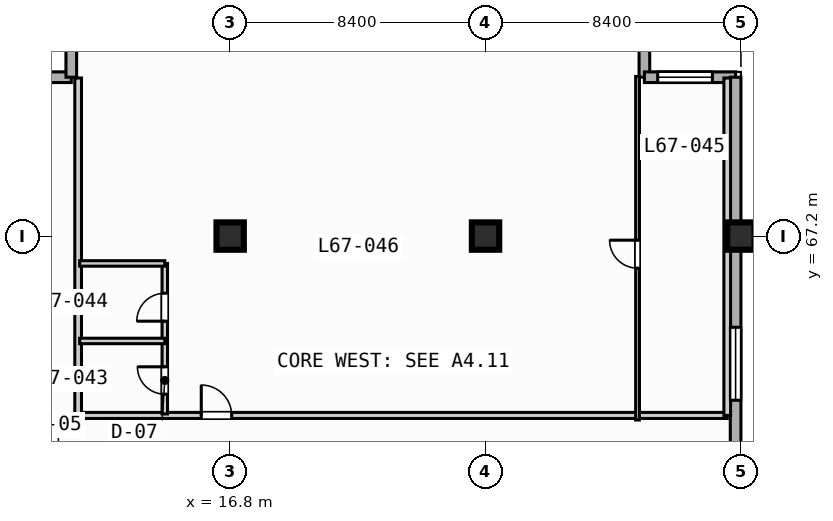
"""IFC4 building model, lengths in metres.
Left out: names, types, materials, properties, quantities, classifications, styles, units other than length and angle.
Written with IfcOpenShell. Run it as: python <this file> out.ifc"""

import sys

from ifc_helpers import new_model, si_unit, direction, frame, frame_2d, origin, origin_2d, place, context, subcontext, project, spatial, rectangle, extrude, element, fill, save


model = new_model("IFC4")
c1 = context("Model", 3, precision=1e-05, world=origin(), true_north=direction((0.0, 1.0)))
c2 = subcontext(c1, "Body", "Model", "MODEL_VIEW")
j1 = project(units=[si_unit("LENGTHUNIT", "METRE"), si_unit("PLANEANGLEUNIT", "RADIAN")], contexts=[c1])
p1 = place(None, origin())
s1 = spatial("IfcSite", under=j1, at=p1, CompositionType="ELEMENT")
p2 = place(p1, origin())
s2 = spatial("IfcBuilding", under=s1, at=p2, CompositionType="ELEMENT")
p3 = place(p2, frame((0.0, 0.0, 271.2)))
s3 = spatial("IfcBuildingStorey", under=s2, at=p3, CompositionType="ELEMENT", Elevation=271.2)
for number, where, z_axis, x_axis in (
    (1, (16.8, 67.2, 0.0), (0.0, 0.0, 1.0), (1.0, 0.0, 0.0)),
    (2, (25.2, 67.2, 0.0), (0.0, 0.0, 1.0), (1.0, 0.0, 0.0)),
    (3, (33.6, 67.2, 0.0), (0.0, 0.0, 1.0), (1.0, 0.0, 0.0)),
):
    element("IfcColumn", number, at=place(p3, frame(where, z_axis=z_axis, x_axis=x_axis)), inside=s3, PredefinedType="COLUMN", context=c2, shape_type="SweptSolid", body=[
        extrude(rectangle(XDim=0.9, YDim=0.9, at=origin_2d()), origin(), (0.0, 0.0, 1.0), 3.7),
    ])
for number, where, z_axis, x_axis in (
    (4, (8.575, 72.425, 0.0), (0.0, 0.0, 1.0), (1.0, 0.0, 0.0)),
    (5, (11.575, 72.425, 0.0), (0.0, 0.0, 1.0), (0.0, 1.0, 0.0)),
    (6, (30.425, 75.425, 0.0), (0.0, 0.0, 1.0), (0.0, -1.0, 0.0)),
):
    element("IfcWall", number, at=place(p3, frame(where, z_axis=z_axis, x_axis=x_axis)), inside=s3, PredefinedType="STANDARD", context=c2, shape_type="SweptSolid", body=[
        extrude(rectangle(XDim=3.0, YDim=0.35, at=frame_2d((1.5, 0.0))), origin(), (0.0, 0.0, 1.0), 3.47),
    ])
p4 = place(p3, frame((30.425, 72.425, 0.0), z_axis=(0.0, 0.0, 1.0), x_axis=(1.0, 0.0, 0.0)))
e7 = element("IfcWall", 7, at=p4, inside=s3, PredefinedType="STANDARD", context=c2, shape_type="SweptSolid", body=[
    extrude(rectangle(XDim=3.0, YDim=0.35, at=frame_2d((1.5, 0.0))), origin(), (0.0, 0.0, 1.0), 3.47),
])
p5 = place(p4, frame((0.438, 0.0, 0.85)))
e8 = element("IfcOpeningElement", 8, at=p5, cuts=e7, PredefinedType="OPENING", context=c2, shape_type="SweptSolid", body=[
    extrude(rectangle(XDim=1.8, YDim=1.8, at=frame_2d((0.9, 0.9))), frame((0.0, 0.185, 0.0), z_axis=(0.0, -1.0, 0.0), x_axis=(1.0, 0.0, 0.0)), (0.0, 0.0, 1.0), 0.37),
])
p6 = place(p3, frame((33.425, 72.425, 0.0), z_axis=(0.0, 0.0, 1.0), x_axis=(0.0, -1.0, 0.0)))
e9 = element("IfcWall", 9, at=p6, inside=s3, PredefinedType="STANDARD", context=c2, shape_type="SweptSolid", body=[
    extrude(rectangle(XDim=39.0, YDim=0.35, at=frame_2d((19.5, 0.0))), origin(), (0.0, 0.0, 1.0), 3.47),
])
p7 = place(p6, frame((33.725, 0.0, 0.85)))
e10 = element("IfcOpeningElement", 10, at=p7, cuts=e9, PredefinedType="OPENING", context=c2, shape_type="SweptSolid", body=[
    extrude(rectangle(XDim=1.8, YDim=1.8, at=frame_2d((0.9, 0.9))), frame((0.0, 0.185, 0.0), z_axis=(0.0, -1.0, 0.0), x_axis=(1.0, 0.0, 0.0)), (0.0, 0.0, 1.0), 0.37),
])
p8 = place(p6, frame((8.225, 0.0, 0.85)))
e11 = element("IfcOpeningElement", 11, at=p8, cuts=e9, PredefinedType="OPENING", context=c2, shape_type="SweptSolid", body=[
    extrude(rectangle(XDim=2.4, YDim=1.95, at=frame_2d((1.2, 0.975))), frame((0.0, 0.185, 0.0), z_axis=(0.0, -1.0, 0.0), x_axis=(1.0, 0.0, 0.0)), (0.0, 0.0, 1.0), 0.37),
])
p9 = place(p3, frame((11.8, 61.3, 0.0), z_axis=(0.0, 0.0, 1.0), x_axis=(1.0, 0.0, 0.0)))
e12 = element("IfcWall", 12, at=p9, inside=s3, PredefinedType="PARTITIONING", context=c2, shape_type="SweptSolid", body=[
    extrude(rectangle(XDim=21.35, YDim=0.2, at=frame_2d((10.675, 0.0))), origin(), (0.0, 0.0, 1.0), 3.47),
])
p10 = place(p9, frame((4.05, 0.0, 0.0)))
e13 = element("IfcOpeningElement", 13, at=p10, cuts=e12, PredefinedType="OPENING", context=c2, shape_type="SweptSolid", body=[
    extrude(rectangle(XDim=1.0, YDim=2.15, at=frame_2d((0.5, 1.075))), frame((0.0, 0.11, 0.0), z_axis=(0.0, -1.0, 0.0), x_axis=(1.0, 0.0, 0.0)), (0.0, 0.0, 1.0), 0.22),
])
for number, where, z_axis, x_axis in (
    (14, (33.15, 61.3, 0.0), (0.0, 0.0, 1.0), (0.0, 1.0, 0.0)),
    (15, (11.8, 61.3, 0.0), (0.0, 0.0, 1.0), (0.0, 1.0, 0.0)),
):
    element("IfcWall", number, at=place(p3, frame(where, z_axis=z_axis, x_axis=x_axis)), inside=s3, PredefinedType="PARTITIONING", context=c2, shape_type="SweptSolid", body=[
        extrude(rectangle(XDim=11.1, YDim=0.22, at=frame_2d((5.55, 0.0))), origin(), (0.0, 0.0, 1.0), 3.47),
    ])
p11 = place(p3, frame((14.65, 61.35, 0.0), z_axis=(0.0, 0.0, 1.0), x_axis=(0.0, 1.0, 0.0)))
e16 = element("IfcWall", 16, at=p11, inside=s3, PredefinedType="PLUMBINGWALL", context=c2, shape_type="SweptSolid", body=[
    extrude(rectangle(XDim=4.95, YDim=0.18, at=frame_2d((2.475, 0.0))), origin(), (0.0, 0.0, 1.0), 3.47),
])
p12 = place(p11, frame((0.65, 0.0, 0.0)))
e17 = element("IfcOpeningElement", 17, at=p12, cuts=e16, PredefinedType="OPENING", context=c2, shape_type="SweptSolid", body=[
    extrude(rectangle(XDim=0.9, YDim=2.1, at=frame_2d((0.45, 1.05))), frame((0.0, 0.1, 0.0), z_axis=(0.0, -1.0, 0.0), x_axis=(1.0, 0.0, 0.0)), (0.0, 0.0, 1.0), 0.2),
])
p13 = place(p11, frame((3.05, 0.0, 0.0)))
e18 = element("IfcOpeningElement", 18, at=p13, cuts=e16, PredefinedType="OPENING", context=c2, shape_type="SweptSolid", body=[
    extrude(rectangle(XDim=0.92, YDim=2.1, at=frame_2d((0.46, 1.05))), frame((0.0, 0.1, 0.0), z_axis=(0.0, -1.0, 0.0), x_axis=(1.0, 0.0, 0.0)), (0.0, 0.0, 1.0), 0.2),
])
for number, where, z_axis, x_axis in (
    (19, (11.85, 63.75, 0.0), (0.0, 0.0, 1.0), (1.0, 0.0, 0.0)),
    (20, (11.85, 66.3, 0.0), (0.0, 0.0, 1.0), (1.0, 0.0, 0.0)),
):
    element("IfcWall", number, at=place(p3, frame(where, z_axis=z_axis, x_axis=x_axis)), inside=s3, PredefinedType="PLUMBINGWALL", context=c2, shape_type="SweptSolid", body=[
        extrude(rectangle(XDim=2.8, YDim=0.18, at=frame_2d((1.4, 0.0))), origin(), (0.0, 0.0, 1.0), 3.47),
    ])
p14 = place(p3, frame((30.2, 61.15, 0.0), z_axis=(0.0, 0.0, 1.0), x_axis=(0.0, 1.0, 0.0)))
e21 = element("IfcWall", 21, at=p14, inside=s3, PredefinedType="PARTITIONING", context=c2, shape_type="SweptSolid", body=[
    extrude(rectangle(XDim=11.3, YDim=0.125, at=frame_2d((5.65, 0.0))), origin(), (0.0, 0.0, 1.0), 3.47),
])
p15 = place(p14, frame((4.995, 0.0, 0.0)))
e22 = element("IfcOpeningElement", 22, at=p15, cuts=e21, PredefinedType="OPENING", context=c2, shape_type="SweptSolid", body=[
    extrude(rectangle(XDim=0.92, YDim=2.1, at=frame_2d((0.46, 1.05))), frame((0.0, 0.073, 0.0), z_axis=(0.0, -1.0, 0.0), x_axis=(1.0, 0.0, 0.0)), (0.0, 0.0, 1.0), 0.145),
])
p16 = place(p5, origin())
e23 = element("IfcWindow", 23, at=p16, inside=s3, PartitioningType="SINGLE_PANEL", PredefinedType="WINDOW", context=c2, shape_type="SweptSolid", body=[
    extrude(rectangle(XDim=1.8, YDim=1.8, at=frame_2d((0.9, 0.9))), frame((0.0, 0.03, 0.0), z_axis=(0.0, -1.0, 0.0), x_axis=(1.0, 0.0, 0.0)), (0.0, 0.0, 1.0), 0.06),
])
fill(e8, e23)
p17 = place(p8, origin())
e24 = element("IfcWindow", 24, at=p17, inside=s3, PartitioningType="SINGLE_PANEL", PredefinedType="WINDOW", context=c2, shape_type="SweptSolid", body=[
    extrude(rectangle(XDim=2.4, YDim=1.95, at=frame_2d((1.2, 0.975))), frame((0.0, 0.03, 0.0), z_axis=(0.0, -1.0, 0.0), x_axis=(1.0, 0.0, 0.0)), (0.0, 0.0, 1.0), 0.06),
])
fill(e11, e24)
p18 = place(p10, origin())
e25 = element("IfcDoor", 25, at=p18, inside=s3, OperationType="SINGLE_SWING_LEFT", PredefinedType="DOOR", context=c2, shape_type="SweptSolid", body=[
    extrude(rectangle(XDim=1.0, YDim=2.15, at=frame_2d((0.5, 1.075))), frame((0.0, 0.025, 0.0), z_axis=(0.0, -1.0, 0.0), x_axis=(1.0, 0.0, 0.0)), (0.0, 0.0, 1.0), 0.05),
])
fill(e13, e25)
p19 = place(p12, origin())
e26 = element("IfcDoor", 26, at=p19, inside=s3, OperationType="SINGLE_SWING_RIGHT", PredefinedType="DOOR", context=c2, shape_type="SweptSolid", body=[
    extrude(rectangle(XDim=0.9, YDim=2.1, at=frame_2d((0.45, 1.05))), frame((0.0, 0.025, 0.0), z_axis=(0.0, -1.0, 0.0), x_axis=(1.0, 0.0, 0.0)), (0.0, 0.0, 1.0), 0.05),
])
fill(e17, e26)
p20 = place(p13, origin())
e27 = element("IfcDoor", 27, at=p20, inside=s3, OperationType="SINGLE_SWING_LEFT", PredefinedType="DOOR", context=c2, shape_type="SweptSolid", body=[
    extrude(rectangle(XDim=0.92, YDim=2.1, at=frame_2d((0.46, 1.05))), frame((0.0, 0.025, 0.0), z_axis=(0.0, -1.0, 0.0), x_axis=(1.0, 0.0, 0.0)), (0.0, 0.0, 1.0), 0.05),
])
fill(e18, e27)
p21 = place(p15, origin())
e28 = element("IfcDoor", 28, at=p21, inside=s3, OperationType="SINGLE_SWING_RIGHT", PredefinedType="DOOR", context=c2, shape_type="SweptSolid", body=[
    extrude(rectangle(XDim=0.92, YDim=2.1, at=frame_2d((0.46, 1.05))), frame((0.0, 0.025, 0.0), z_axis=(0.0, -1.0, 0.0), x_axis=(1.0, 0.0, 0.0)), (0.0, 0.0, 1.0), 0.05),
])
fill(e22, e28)
save(model, sys.argv[1])
